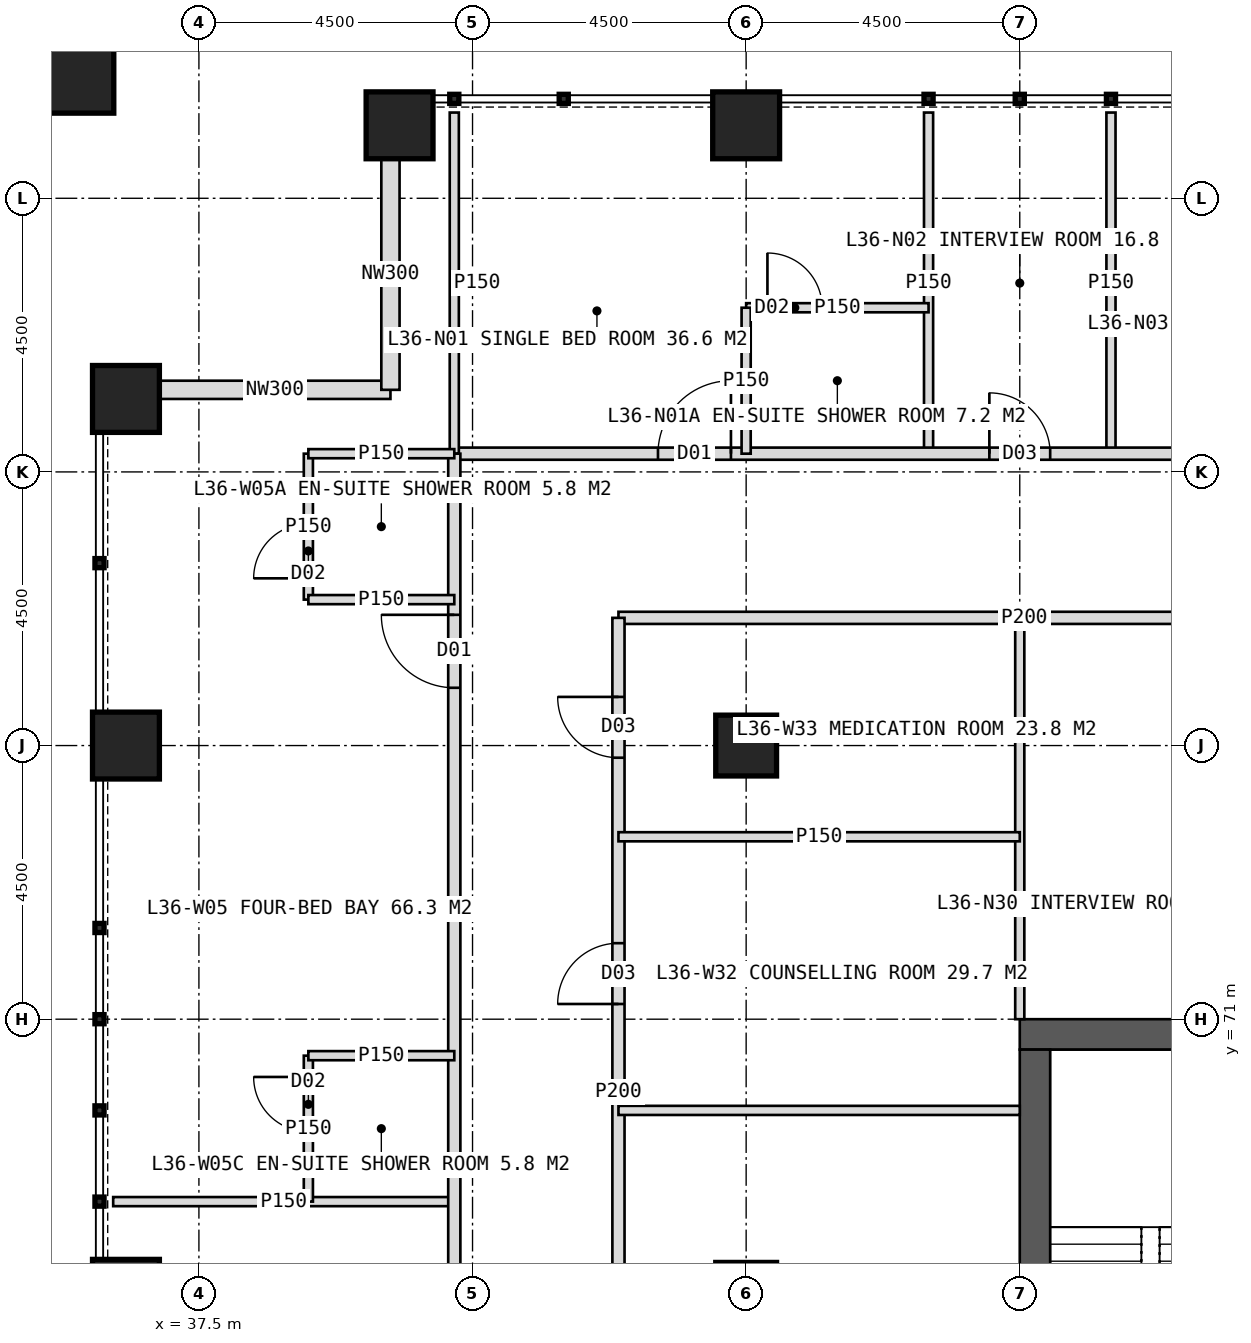
"""IFC4 building model, lengths in metres.
Left out: names, types, materials, properties, quantities, classifications, styles, units other than length and angle.
Written with IfcOpenShell. Run it as: python <this file> out.ifc"""

import sys

from ifc_helpers import new_model, si_unit, direction, frame, frame_2d, origin, origin_2d, place, context, subcontext, project, spatial, rectangle, hollow_rectangle, extrude, element, fill, save


model = new_model("IFC4")
c1 = context("Model", 3, precision=1e-05, world=origin(), true_north=direction((0.0, 1.0)))
c2 = subcontext(c1, "Body", "Model", "MODEL_VIEW")
j1 = project(units=[si_unit("LENGTHUNIT", "METRE"), si_unit("PLANEANGLEUNIT", "RADIAN")], contexts=[c1])
p1 = place(None, origin())
s1 = spatial("IfcSite", under=j1, at=p1, CompositionType="ELEMENT")
p2 = place(p1, origin())
s2 = spatial("IfcBuilding", under=s1, at=p2, CompositionType="ELEMENT")
p3 = place(p2, frame((0.0, 0.0, 152.0)))
s3 = spatial("IfcBuildingStorey", under=s2, at=p3, CompositionType="ELEMENT", Elevation=152.0)
p4 = place(p3, frame((51.0, 70.75, 0.0), z_axis=(0.0, 0.0, 1.0), x_axis=(1.0, 0.0, 0.0)))
e1 = element("IfcWall", 1, at=p4, inside=s3, PredefinedType="SHEAR", context=c2, shape_type="SweptSolid", body=[
    extrude(rectangle(XDim=18.0, YDim=0.5, at=frame_2d((9.0, 0.0))), origin(), (0.0, 0.0, 1.0), 4.0),
])
p5 = place(p4, frame((8.1, 0.0, 0.0)))
e2 = element("IfcOpeningElement", 2, at=p5, cuts=e1, PredefinedType="OPENING", context=c2, shape_type="SweptSolid", body=[
    extrude(rectangle(XDim=1.8, YDim=2.2, at=frame_2d((0.9, 1.1))), frame((0.0, 0.26, 0.0), z_axis=(0.0, -1.0, 0.0), x_axis=(1.0, 0.0, 0.0)), (0.0, 0.0, 1.0), 0.52),
])
p6 = place(p3, frame((51.25, 53.5, 0.0), z_axis=(0.0, 0.0, 1.0), x_axis=(0.0, 1.0, 0.0)))
e3 = element("IfcWall", 3, at=p6, inside=s3, PredefinedType="SHEAR", context=c2, shape_type="SweptSolid", body=[
    extrude(rectangle(XDim=17.0, YDim=0.5, at=frame_2d((8.5, 0.0))), origin(), (0.0, 0.0, 1.0), 4.0),
])
p7 = place(p6, frame((6.0, 0.0, 0.0)))
e4 = element("IfcOpeningElement", 4, at=p7, cuts=e3, PredefinedType="OPENING", context=c2, shape_type="SweptSolid", body=[
    extrude(rectangle(XDim=1.5, YDim=2.2, at=frame_2d((0.75, 1.1))), frame((0.0, 0.26, 0.0), z_axis=(0.0, -1.0, 0.0), x_axis=(1.0, 0.0, 0.0)), (0.0, 0.0, 1.0), 0.52),
])
p8 = place(p3, frame((46.5, 75.5, 0.0), z_axis=(0.0, 0.0, 1.0), x_axis=(1.0, 0.0, 0.0)))
e5 = element("IfcColumn", 5, at=p8, inside=s3, PredefinedType="COLUMN", context=c2, shape_type="SweptSolid", body=[
    extrude(hollow_rectangle(XDim=1.0, YDim=1.0, WallThickness=0.1, at=origin_2d()), origin(), (0.0, 0.0, 1.0), 4.0),
])
for number, where, z_axis, x_axis in (
    (6, (40.8, 85.7, 0.0), (0.0, 0.0, 1.0), (1.0, 0.0, 0.0)),
    (7, (46.5, 85.7, 0.0), (0.0, 0.0, 1.0), (1.0, 0.0, 0.0)),
    (8, (36.3, 66.5, 0.0), (0.0, 0.0, 1.0), (1.0, 0.0, 0.0)),
    (9, (36.3, 75.5, 0.0), (0.0, 0.0, 1.0), (1.0, 0.0, 0.0)),
    (10, (36.3, 81.2, 0.0), (0.0, 0.0, 1.0), (1.0, 0.0, 0.0)),
):
    element("IfcColumn", number, at=place(p3, frame(where, z_axis=z_axis, x_axis=x_axis)), inside=s3, PredefinedType="COLUMN", context=c2, shape_type="SweptSolid", body=[
        extrude(hollow_rectangle(XDim=1.1, YDim=1.1, WallThickness=0.1, at=origin_2d()), origin(), (0.0, 0.0, 1.0), 4.0),
    ])
p9 = place(p3, frame((35.4, 86.6, 0.0), z_axis=(0.0, 0.0, 1.0), x_axis=(1.0, 0.0, 0.0)))
e11 = element("IfcColumn", 11, at=p9, inside=s3, PredefinedType="COLUMN", context=c2, shape_type="SweptSolid", body=[
    extrude(hollow_rectangle(XDim=1.4, YDim=1.4, WallThickness=0.08, at=origin_2d()), origin(), (0.0, 0.0, 1.0), 4.0),
])
for number, where, z_axis, x_axis in (
    (12, (36.85, 81.35, 0.0), (0.0, 0.0, 1.0), (1.0, 0.0, 0.0)),
    (13, (40.65, 81.35, 0.0), (0.0, 0.0, 1.0), (0.0, 1.0, 0.0)),
):
    element("IfcWall", number, at=place(p3, frame(where, z_axis=z_axis, x_axis=x_axis)), inside=s3, PredefinedType="ELEMENTEDWALL", context=c2, shape_type="SweptSolid", body=[
        extrude(rectangle(XDim=3.8, YDim=0.3, at=frame_2d((1.9, 0.0))), origin(), (0.0, 0.0, 1.0), 4.0),
    ])
for number, where, z_axis, x_axis in (
    (14, (49.5, 80.3, 0.0), (0.0, 0.0, 1.0), (0.0, 1.0, 0.0)),
    (15, (52.5, 80.3, 0.0), (0.0, 0.0, 1.0), (0.0, 1.0, 0.0)),
):
    element("IfcWall", number, at=place(p3, frame(where, z_axis=z_axis, x_axis=x_axis)), inside=s3, PredefinedType="PARTITIONING", context=c2, shape_type="SweptSolid", body=[
        extrude(rectangle(XDim=5.61, YDim=0.15, at=frame_2d((2.805, 0.0))), origin(), (0.0, 0.0, 1.0), 3.75),
    ])
p10 = place(p3, frame((41.7, 80.3, 0.0), z_axis=(0.0, 0.0, 1.0), x_axis=(1.0, 0.0, 0.0)))
e16 = element("IfcWall", 16, at=p10, inside=s3, PredefinedType="PARTITIONING", context=c2, shape_type="SweptSolid", body=[
    extrude(rectangle(XDim=36.6, YDim=0.2, at=frame_2d((18.3, 0.0))), origin(), (0.0, 0.0, 1.0), 3.75),
])
p11 = place(p10, frame((3.35, 0.0, 0.0)))
e17 = element("IfcOpeningElement", 17, at=p11, cuts=e16, PredefinedType="OPENING", context=c2, shape_type="SweptSolid", body=[
    extrude(rectangle(XDim=1.2, YDim=2.2, at=frame_2d((0.6, 1.1))), frame((0.0, 0.11, 0.0), z_axis=(0.0, -1.0, 0.0), x_axis=(1.0, 0.0, 0.0)), (0.0, 0.0, 1.0), 0.22),
])
p12 = place(p10, frame((8.8, 0.0, 0.0)))
e18 = element("IfcOpeningElement", 18, at=p12, cuts=e16, PredefinedType="OPENING", context=c2, shape_type="SweptSolid", body=[
    extrude(rectangle(XDim=1.0, YDim=2.1, at=frame_2d((0.5, 1.05))), frame((0.0, 0.11, 0.0), z_axis=(0.0, -1.0, 0.0), x_axis=(1.0, 0.0, 0.0)), (0.0, 0.0, 1.0), 0.22),
])
p13 = place(p10, frame((15.35, 0.0, 0.0)))
e19 = element("IfcOpeningElement", 19, at=p13, cuts=e16, PredefinedType="OPENING", context=c2, shape_type="SweptSolid", body=[
    extrude(rectangle(XDim=1.2, YDim=2.2, at=frame_2d((0.6, 1.1))), frame((0.0, 0.11, 0.0), z_axis=(0.0, -1.0, 0.0), x_axis=(1.0, 0.0, 0.0)), (0.0, 0.0, 1.0), 0.22),
])
p14 = place(p10, frame((22.45, 0.0, 0.0)))
e20 = element("IfcOpeningElement", 20, at=p14, cuts=e16, PredefinedType="OPENING", context=c2, shape_type="SweptSolid", body=[
    extrude(rectangle(XDim=1.2, YDim=2.2, at=frame_2d((0.6, 1.1))), frame((0.0, 0.11, 0.0), z_axis=(0.0, -1.0, 0.0), x_axis=(1.0, 0.0, 0.0)), (0.0, 0.0, 1.0), 0.22),
])
p15 = place(p3, frame((41.7, 80.3, 0.0), z_axis=(0.0, 0.0, 1.0), x_axis=(0.0, 1.0, 0.0)))
e21 = element("IfcWall", 21, at=p15, inside=s3, PredefinedType="PARTITIONING", context=c2, shape_type="SweptSolid", body=[
    extrude(rectangle(XDim=5.61, YDim=0.15, at=frame_2d((2.805, 0.0))), origin(), (0.0, 0.0, 1.0), 3.75),
])
p16 = place(p3, frame((46.5, 82.7, 0.0), z_axis=(0.0, 0.0, 1.0), x_axis=(1.0, 0.0, 0.0)))
e22 = element("IfcWall", 22, at=p16, inside=s3, PredefinedType="PARTITIONING", context=c2, shape_type="SweptSolid", body=[
    extrude(rectangle(XDim=3.0, YDim=0.15, at=frame_2d((1.5, 0.0))), origin(), (0.0, 0.0, 1.0), 3.75),
])
p17 = place(p16, frame((0.35, 0.0, 0.0)))
e23 = element("IfcOpeningElement", 23, at=p17, cuts=e22, PredefinedType="OPENING", context=c2, shape_type="SweptSolid", body=[
    extrude(rectangle(XDim=0.9, YDim=2.1, at=frame_2d((0.45, 1.05))), frame((0.0, 0.085, 0.0), z_axis=(0.0, -1.0, 0.0), x_axis=(1.0, 0.0, 0.0)), (0.0, 0.0, 1.0), 0.17),
])
p18 = place(p3, frame((46.5, 80.3, 0.0), z_axis=(0.0, 0.0, 1.0), x_axis=(0.0, 1.0, 0.0)))
e24 = element("IfcWall", 24, at=p18, inside=s3, PredefinedType="PARTITIONING", context=c2, shape_type="SweptSolid", body=[
    extrude(rectangle(XDim=2.4, YDim=0.15, at=frame_2d((1.2, 0.0))), origin(), (0.0, 0.0, 1.0), 2.95),
])
p19 = place(p3, frame((51.0, 71.0, 0.0), z_axis=(0.0, 0.0, 1.0), x_axis=(0.0, 1.0, 0.0)))
e25 = element("IfcWall", 25, at=p19, inside=s3, PredefinedType="PARTITIONING", context=c2, shape_type="SweptSolid", body=[
    extrude(rectangle(XDim=6.6, YDim=0.15, at=frame_2d((3.3, 0.0))), origin(), (0.0, 0.0, 1.0), 3.75),
])
p20 = place(p3, frame((44.4, 77.6, 0.0), z_axis=(0.0, 0.0, 1.0), x_axis=(1.0, 0.0, 0.0)))
e26 = element("IfcWall", 26, at=p20, inside=s3, PredefinedType="PARTITIONING", context=c2, shape_type="SweptSolid", body=[
    extrude(rectangle(XDim=13.35, YDim=0.2, at=frame_2d((6.675, 0.0))), origin(), (0.0, 0.0, 1.0), 3.75),
])
p21 = place(p20, frame((9.475, 0.0, 0.0)))
e27 = element("IfcOpeningElement", 27, at=p21, cuts=e26, PredefinedType="OPENING", context=c2, shape_type="SweptSolid", body=[
    extrude(rectangle(XDim=1.0, YDim=2.1, at=frame_2d((0.5, 1.05))), frame((0.0, 0.11, 0.0), z_axis=(0.0, -1.0, 0.0), x_axis=(1.0, 0.0, 0.0)), (0.0, 0.0, 1.0), 0.22),
])
p22 = place(p3, frame((41.7, 68.0, 0.0), z_axis=(0.0, 0.0, 1.0), x_axis=(-1.0, 0.0, 0.0)))
e28 = element("IfcWall", 28, at=p22, inside=s3, PredefinedType="PARTITIONING", context=c2, shape_type="SweptSolid", body=[
    extrude(rectangle(XDim=5.61, YDim=0.15, at=frame_2d((2.805, 0.0))), origin(), (0.0, 0.0, 1.0), 3.75),
])
p23 = place(p3, frame((41.7, 43.7, 0.0), z_axis=(0.0, 0.0, 1.0), x_axis=(0.0, 1.0, 0.0)))
e29 = element("IfcWall", 29, at=p23, inside=s3, PredefinedType="PARTITIONING", context=c2, shape_type="SweptSolid", body=[
    extrude(rectangle(XDim=36.6, YDim=0.2, at=frame_2d((18.3, 0.0))), origin(), (0.0, 0.0, 1.0), 3.75),
])
p24 = place(p23, frame((3.35, 0.0, 0.0)))
e30 = element("IfcOpeningElement", 30, at=p24, cuts=e29, PredefinedType="OPENING", context=c2, shape_type="SweptSolid", body=[
    extrude(rectangle(XDim=1.2, YDim=2.2, at=frame_2d((0.6, 1.1))), frame((0.0, 0.11, 0.0), z_axis=(0.0, -1.0, 0.0), x_axis=(1.0, 0.0, 0.0)), (0.0, 0.0, 1.0), 0.22),
])
p25 = place(p23, frame((11.05, 0.0, 0.0)))
e31 = element("IfcOpeningElement", 31, at=p25, cuts=e29, PredefinedType="OPENING", context=c2, shape_type="SweptSolid", body=[
    extrude(rectangle(XDim=1.2, YDim=2.2, at=frame_2d((0.6, 1.1))), frame((0.0, 0.11, 0.0), z_axis=(0.0, -1.0, 0.0), x_axis=(1.0, 0.0, 0.0)), (0.0, 0.0, 1.0), 0.22),
])
p26 = place(p23, frame((16.3, 0.0, 0.0)))
e32 = element("IfcOpeningElement", 32, at=p26, cuts=e29, PredefinedType="OPENING", context=c2, shape_type="SweptSolid", body=[
    extrude(rectangle(XDim=1.0, YDim=2.1, at=frame_2d((0.5, 1.05))), frame((0.0, 0.11, 0.0), z_axis=(0.0, -1.0, 0.0), x_axis=(1.0, 0.0, 0.0)), (0.0, 0.0, 1.0), 0.22),
])
p27 = place(p23, frame((20.95, 0.0, 0.0)))
e33 = element("IfcOpeningElement", 33, at=p27, cuts=e29, PredefinedType="OPENING", context=c2, shape_type="SweptSolid", body=[
    extrude(rectangle(XDim=1.2, YDim=2.2, at=frame_2d((0.6, 1.1))), frame((0.0, 0.11, 0.0), z_axis=(0.0, -1.0, 0.0), x_axis=(1.0, 0.0, 0.0)), (0.0, 0.0, 1.0), 0.22),
])
p28 = place(p23, frame((32.75, 0.0, 0.0)))
e34 = element("IfcOpeningElement", 34, at=p28, cuts=e29, PredefinedType="OPENING", context=c2, shape_type="SweptSolid", body=[
    extrude(rectangle(XDim=1.2, YDim=2.2, at=frame_2d((0.6, 1.1))), frame((0.0, 0.11, 0.0), z_axis=(0.0, -1.0, 0.0), x_axis=(1.0, 0.0, 0.0)), (0.0, 0.0, 1.0), 0.22),
])
p29 = place(p3, frame((39.3, 77.9, 0.0), z_axis=(0.0, 0.0, 1.0), x_axis=(0.0, 1.0, 0.0)))
e35 = element("IfcWall", 35, at=p29, inside=s3, PredefinedType="PARTITIONING", context=c2, shape_type="SweptSolid", body=[
    extrude(rectangle(XDim=2.4, YDim=0.15, at=frame_2d((1.2, 0.0))), origin(), (0.0, 0.0, 1.0), 3.75),
])
p30 = place(p29, frame((0.35, 0.0, 0.0)))
e36 = element("IfcOpeningElement", 36, at=p30, cuts=e35, PredefinedType="OPENING", context=c2, shape_type="SweptSolid", body=[
    extrude(rectangle(XDim=0.9, YDim=2.1, at=frame_2d((0.45, 1.05))), frame((0.0, 0.085, 0.0), z_axis=(0.0, -1.0, 0.0), x_axis=(1.0, 0.0, 0.0)), (0.0, 0.0, 1.0), 0.17),
])
p31 = place(p3, frame((41.7, 77.9, 0.0), z_axis=(0.0, 0.0, 1.0), x_axis=(-1.0, 0.0, 0.0)))
e37 = element("IfcWall", 37, at=p31, inside=s3, PredefinedType="PARTITIONING", context=c2, shape_type="SweptSolid", body=[
    extrude(rectangle(XDim=2.4, YDim=0.15, at=frame_2d((1.2, 0.0))), origin(), (0.0, 0.0, 1.0), 3.75),
])
p32 = place(p3, frame((39.3, 68.0, 0.0), z_axis=(0.0, 0.0, 1.0), x_axis=(0.0, 1.0, 0.0)))
e38 = element("IfcWall", 38, at=p32, inside=s3, PredefinedType="PARTITIONING", context=c2, shape_type="SweptSolid", body=[
    extrude(rectangle(XDim=2.4, YDim=0.15, at=frame_2d((1.2, 0.0))), origin(), (0.0, 0.0, 1.0), 3.75),
])
p33 = place(p32, frame((1.15, 0.0, 0.0)))
e39 = element("IfcOpeningElement", 39, at=p33, cuts=e38, PredefinedType="OPENING", context=c2, shape_type="SweptSolid", body=[
    extrude(rectangle(XDim=0.9, YDim=2.1, at=frame_2d((0.45, 1.05))), frame((0.0, 0.085, 0.0), z_axis=(0.0, -1.0, 0.0), x_axis=(1.0, 0.0, 0.0)), (0.0, 0.0, 1.0), 0.17),
])
for number, where, z_axis, x_axis in (
    (40, (41.7, 70.4, 0.0), (0.0, 0.0, 1.0), (-1.0, 0.0, 0.0)),
    (41, (41.7, 80.3, 0.0), (0.0, 0.0, 1.0), (-1.0, 0.0, 0.0)),
):
    element("IfcWall", number, at=place(p3, frame(where, z_axis=z_axis, x_axis=x_axis)), inside=s3, PredefinedType="PARTITIONING", context=c2, shape_type="SweptSolid", body=[
        extrude(rectangle(XDim=2.4, YDim=0.15, at=frame_2d((1.2, 0.0))), origin(), (0.0, 0.0, 1.0), 3.75),
    ])
p34 = place(p3, frame((44.4, 62.0, 0.0), z_axis=(0.0, 0.0, 1.0), x_axis=(0.0, 1.0, 0.0)))
e42 = element("IfcWall", 42, at=p34, inside=s3, PredefinedType="PARTITIONING", context=c2, shape_type="SweptSolid", body=[
    extrude(rectangle(XDim=15.6, YDim=0.2, at=frame_2d((7.8, 0.0))), origin(), (0.0, 0.0, 1.0), 3.75),
])
p35 = place(p34, frame((3.25, 0.0, 0.0)))
e43 = element("IfcOpeningElement", 43, at=p35, cuts=e42, PredefinedType="OPENING", context=c2, shape_type="SweptSolid", body=[
    extrude(rectangle(XDim=1.0, YDim=2.1, at=frame_2d((0.5, 1.05))), frame((0.0, 0.11, 0.0), z_axis=(0.0, -1.0, 0.0), x_axis=(1.0, 0.0, 0.0)), (0.0, 0.0, 1.0), 0.22),
])
p36 = place(p34, frame((9.25, 0.0, 0.0)))
e44 = element("IfcOpeningElement", 44, at=p36, cuts=e42, PredefinedType="OPENING", context=c2, shape_type="SweptSolid", body=[
    extrude(rectangle(XDim=1.0, YDim=2.1, at=frame_2d((0.5, 1.05))), frame((0.0, 0.11, 0.0), z_axis=(0.0, -1.0, 0.0), x_axis=(1.0, 0.0, 0.0)), (0.0, 0.0, 1.0), 0.22),
])
p37 = place(p34, frame((13.3, 0.0, 0.0)))
e45 = element("IfcOpeningElement", 45, at=p37, cuts=e42, PredefinedType="OPENING", context=c2, shape_type="SweptSolid", body=[
    extrude(rectangle(XDim=1.0, YDim=2.1, at=frame_2d((0.5, 1.05))), frame((0.0, 0.11, 0.0), z_axis=(0.0, -1.0, 0.0), x_axis=(1.0, 0.0, 0.0)), (0.0, 0.0, 1.0), 0.22),
])
for number, where, z_axis, x_axis in (
    (46, (51.0, 69.5, 0.0), (0.0, 0.0, 1.0), (-1.0, 0.0, 0.0)),
    (47, (51.0, 74.0, 0.0), (0.0, 0.0, 1.0), (-1.0, 0.0, 0.0)),
):
    element("IfcWall", number, at=place(p3, frame(where, z_axis=z_axis, x_axis=x_axis)), inside=s3, PredefinedType="PARTITIONING", context=c2, shape_type="SweptSolid", body=[
        extrude(rectangle(XDim=6.6, YDim=0.15, at=frame_2d((3.3, 0.0))), origin(), (0.0, 0.0, 1.0), 3.75),
    ])
p38 = place(p11, origin())
e48 = element("IfcDoor", 48, at=p38, inside=s3, OperationType="SINGLE_SWING_RIGHT", PredefinedType="DOOR", context=c2, shape_type="SweptSolid", body=[
    extrude(rectangle(XDim=1.2, YDim=2.2, at=frame_2d((0.6, 1.1))), frame((0.0, 0.025, 0.0), z_axis=(0.0, -1.0, 0.0), x_axis=(1.0, 0.0, 0.0)), (0.0, 0.0, 1.0), 0.05),
])
fill(e17, e48)
p39 = place(p17, origin())
e49 = element("IfcDoor", 49, at=p39, inside=s3, OperationType="SINGLE_SWING_LEFT", PredefinedType="DOOR", context=c2, shape_type="SweptSolid", body=[
    extrude(rectangle(XDim=0.9, YDim=2.1, at=frame_2d((0.45, 1.05))), frame((0.0, 0.025, 0.0), z_axis=(0.0, -1.0, 0.0), x_axis=(1.0, 0.0, 0.0)), (0.0, 0.0, 1.0), 0.05),
])
fill(e23, e49)
p40 = place(p12, origin())
e50 = element("IfcDoor", 50, at=p40, inside=s3, OperationType="SINGLE_SWING_LEFT", PredefinedType="DOOR", context=c2, shape_type="SweptSolid", body=[
    extrude(rectangle(XDim=1.0, YDim=2.1, at=frame_2d((0.5, 1.05))), frame((0.0, 0.025, 0.0), z_axis=(0.0, -1.0, 0.0), x_axis=(1.0, 0.0, 0.0)), (0.0, 0.0, 1.0), 0.05),
])
fill(e18, e50)
p41 = place(p28, origin())
e51 = element("IfcDoor", 51, at=p41, inside=s3, OperationType="SINGLE_SWING_RIGHT", PredefinedType="DOOR", context=c2, shape_type="SweptSolid", body=[
    extrude(rectangle(XDim=1.2, YDim=2.2, at=frame_2d((0.6, 1.1))), frame((0.0, 0.025, 0.0), z_axis=(0.0, -1.0, 0.0), x_axis=(1.0, 0.0, 0.0)), (0.0, 0.0, 1.0), 0.05),
])
fill(e34, e51)
p42 = place(p30, origin())
e52 = element("IfcDoor", 52, at=p42, inside=s3, OperationType="SINGLE_SWING_LEFT", PredefinedType="DOOR", context=c2, shape_type="SweptSolid", body=[
    extrude(rectangle(XDim=0.9, YDim=2.1, at=frame_2d((0.45, 1.05))), frame((0.0, 0.025, 0.0), z_axis=(0.0, -1.0, 0.0), x_axis=(1.0, 0.0, 0.0)), (0.0, 0.0, 1.0), 0.05),
])
fill(e36, e52)
p43 = place(p33, origin())
e53 = element("IfcDoor", 53, at=p43, inside=s3, OperationType="SINGLE_SWING_RIGHT", PredefinedType="DOOR", context=c2, shape_type="SweptSolid", body=[
    extrude(rectangle(XDim=0.9, YDim=2.1, at=frame_2d((0.45, 1.05))), frame((0.0, 0.025, 0.0), z_axis=(0.0, -1.0, 0.0), x_axis=(1.0, 0.0, 0.0)), (0.0, 0.0, 1.0), 0.05),
])
fill(e39, e53)
p44 = place(p36, origin())
e54 = element("IfcDoor", 54, at=p44, inside=s3, OperationType="SINGLE_SWING_LEFT", PredefinedType="DOOR", context=c2, shape_type="SweptSolid", body=[
    extrude(rectangle(XDim=1.0, YDim=2.1, at=frame_2d((0.5, 1.05))), frame((0.0, 0.025, 0.0), z_axis=(0.0, -1.0, 0.0), x_axis=(1.0, 0.0, 0.0)), (0.0, 0.0, 1.0), 0.05),
])
fill(e44, e54)
p45 = place(p37, origin())
e55 = element("IfcDoor", 55, at=p45, inside=s3, OperationType="SINGLE_SWING_RIGHT", PredefinedType="DOOR", context=c2, shape_type="SweptSolid", body=[
    extrude(rectangle(XDim=1.0, YDim=2.1, at=frame_2d((0.5, 1.05))), frame((0.0, 0.025, 0.0), z_axis=(0.0, -1.0, 0.0), x_axis=(1.0, 0.0, 0.0)), (0.0, 0.0, 1.0), 0.05),
])
fill(e45, e55)
save(model, sys.argv[1])
